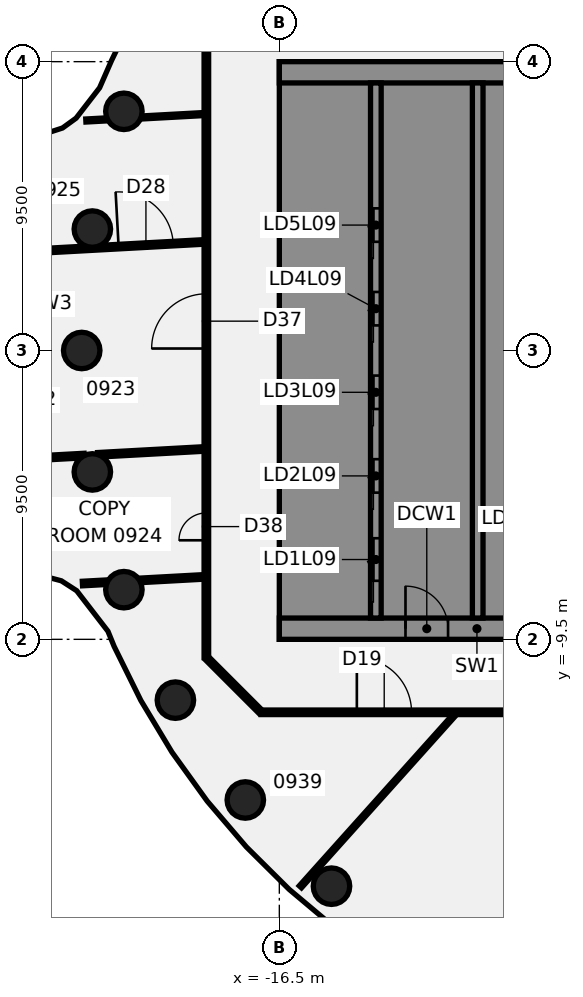
"""IFC4 building model, lengths in metres.
Left out: names, types, materials, properties, quantities, classifications, styles, units other than length and angle.
Written with IfcOpenShell. Run it as: python <this file> out.ifc"""

import sys

from ifc_helpers import new_model, si_unit, direction, frame, frame_2d, origin, origin_2d, place, context, subcontext, project, spatial, polyline, rectangle, circle, outline, extrude, element, fill, save


model = new_model("IFC4")
c1 = context("Model", 3, precision=1e-05, world=origin(), true_north=direction((0.0, 1.0)))
c2 = subcontext(c1, "Body", "Model", "MODEL_VIEW")
j1 = project(units=[si_unit("LENGTHUNIT", "METRE"), si_unit("PLANEANGLEUNIT", "RADIAN")], contexts=[c1])
p1 = place(None, origin())
s1 = spatial("IfcSite", under=j1, at=p1, CompositionType="ELEMENT")
p2 = place(p1, origin())
s2 = spatial("IfcBuilding", under=s1, at=p2, CompositionType="ELEMENT")
p3 = place(p2, frame((0.0, 0.0, 45.25)))
s3 = spatial("IfcBuildingStorey", under=s2, at=p3, CompositionType="ELEMENT", Elevation=45.25)
for number, where, z_axis, x_axis in (
    (1, (-21.613, 7.866, -0.14), (0.0, 0.0, 1.0), (1.0, 0.0, 0.0)),
    (2, (-22.651, 3.994, -0.14), (0.0, 0.0, 1.0), (1.0, 0.0, 0.0)),
    (3, (-23.0, 0.0, -0.14), (0.0, 0.0, 1.0), (1.0, 0.0, 0.0)),
    (4, (-22.651, -3.994, -0.14), (0.0, 0.0, 1.0), (1.0, 0.0, 0.0)),
    (5, (-21.613, -7.866, -0.14), (0.0, 0.0, 1.0), (1.0, 0.0, 0.0)),
    (6, (-19.919, -11.5, -0.14), (0.0, 0.0, 1.0), (1.0, 0.0, 0.0)),
    (7, (-17.619, -14.784, -0.14), (0.0, 0.0, 1.0), (1.0, 0.0, 0.0)),
    (8, (-14.784, -17.619, -0.14), (0.0, 0.0, 1.0), (1.0, 0.0, 0.0)),
):
    element("IfcColumn", number, at=place(p3, frame(where, z_axis=z_axis, x_axis=x_axis)), inside=s3, PredefinedType="COLUMN", context=c2, shape_type="SweptSolid", body=[
        extrude(circle(Radius=0.6, at=origin_2d()), origin(), (0.0, 0.0, 1.0), 3.75),
    ])
p4 = place(p3, frame((-18.872, -10.128, 0.0), z_axis=(0.0, 0.0, 1.0), x_axis=(0.707106781187, -0.707106781187, 0.0)))
e9 = element("IfcWall", 9, at=p4, inside=s3, PredefinedType="PARTITIONING", context=c2, shape_type="SweptSolid", body=[
    extrude(rectangle(XDim=2.465, YDim=0.15, at=frame_2d((1.232, 0.0))), origin(), (0.0, 0.0, 1.0), 3.01),
])
p5 = place(p3, frame((-17.1, -11.9, 0.0), z_axis=(0.0, 0.0, 1.0), x_axis=(1.0, 0.0, 0.0)))
e10 = element("IfcWall", 10, at=p5, inside=s3, PredefinedType="PARTITIONING", context=c2, shape_type="SweptSolid", body=[
    extrude(rectangle(XDim=34.165, YDim=0.15, at=frame_2d((17.083, 0.0))), origin(), (0.0, 0.0, 1.0), 3.01),
])
p6 = place(p5, frame((15.692, 0.0, 0.0)))
e11 = element("IfcOpeningElement", 11, at=p6, cuts=e10, PredefinedType="OPENING", context=c2, shape_type="SweptSolid", body=[
    extrude(rectangle(XDim=1.8, YDim=2.1, at=frame_2d((0.9, 1.05))), frame((0.0, 0.085, 0.0), z_axis=(0.0, -1.0, 0.0), x_axis=(1.0, 0.0, 0.0)), (0.0, 0.0, 1.0), 0.17),
])
p7 = place(p5, frame((3.15, 0.0, 0.0)))
e12 = element("IfcOpeningElement", 12, at=p7, cuts=e10, PredefinedType="OPENING", context=c2, shape_type="SweptSolid", body=[
    extrude(rectangle(XDim=1.8, YDim=2.1, at=frame_2d((0.9, 1.05))), frame((0.0, 0.085, 0.0), z_axis=(0.0, -1.0, 0.0), x_axis=(1.0, 0.0, 0.0)), (0.0, 0.0, 1.0), 0.17),
])
p8 = place(p5, frame((25.658, 0.0, 0.0)))
e13 = element("IfcOpeningElement", 13, at=p8, cuts=e10, PredefinedType="OPENING", context=c2, shape_type="SweptSolid", body=[
    extrude(rectangle(XDim=1.8, YDim=2.1, at=frame_2d((0.9, 1.05))), frame((0.0, 0.085, 0.0), z_axis=(0.0, -1.0, 0.0), x_axis=(1.0, 0.0, 0.0)), (0.0, 0.0, 1.0), 0.17),
])
p9 = place(p3, frame((-25.89, 3.192, 0.0), z_axis=(0.0, 0.0, 1.0), x_axis=(0.998500993822, 0.054733585091, 0.0)))
e14 = element("IfcWall", 14, at=p9, inside=s3, PredefinedType="PARTITIONING", context=c2, shape_type="SweptSolid", body=[
    extrude(rectangle(XDim=6.941, YDim=0.15, at=frame_2d((3.47, 0.0))), origin(), (0.0, 0.0, 1.0), 3.01),
])
p10 = place(p9, frame((4.11, 0.0, 0.0)))
e15 = element("IfcOpeningElement", 15, at=p10, cuts=e14, PredefinedType="OPENING", context=c2, shape_type="SweptSolid", body=[
    extrude(rectangle(XDim=1.8, YDim=2.1, at=frame_2d((0.9, 1.05))), frame((0.0, 0.085, 0.0), z_axis=(0.0, -1.0, 0.0), x_axis=(1.0, 0.0, 0.0)), (0.0, 0.0, 1.0), 0.17),
])
p11 = place(p3, frame((-25.518, -3.598, 0.0), z_axis=(0.0, 0.0, 1.0), x_axis=(0.99849534005, 0.054836629171, 0.0)))
e16 = element("IfcWall", 16, at=p11, inside=s3, PredefinedType="PARTITIONING", context=c2, shape_type="SweptSolid", body=[
    extrude(rectangle(XDim=2.604, YDim=0.15, at=frame_2d((1.302, 0.0))), origin(), (0.0, 0.0, 1.0), 3.01),
])
p12 = place(p3, frame((-22.475, -3.431, 0.0), z_axis=(0.0, 0.0, 1.0), x_axis=(0.998497685075, 0.054793912976, 0.0)))
e17 = element("IfcWall", 17, at=p12, inside=s3, PredefinedType="PARTITIONING", context=c2, shape_type="SweptSolid", body=[
    extrude(rectangle(XDim=3.52, YDim=0.15, at=frame_2d((1.76, 0.0))), origin(), (0.0, 0.0, 1.0), 3.01),
])
p13 = place(p3, frame((-22.976, -7.665, 0.0), z_axis=(0.0, 0.0, 1.0), x_axis=(0.998515707931, 0.05446449316, 0.0)))
e18 = element("IfcWall", 18, at=p13, inside=s3, PredefinedType="PARTITIONING", context=c2, shape_type="SweptSolid", body=[
    extrude(rectangle(XDim=0.82, YDim=0.15, at=frame_2d((0.41, 0.0))), origin(), (0.0, 0.0, 1.0), 3.01),
])
p14 = place(p3, frame((-21.085, -7.562, 0.0), z_axis=(0.0, 0.0, 1.0), x_axis=(0.998507642366, 0.054612161067, 0.0)))
e19 = element("IfcWall", 19, at=p14, inside=s3, PredefinedType="PARTITIONING", context=c2, shape_type="SweptSolid", body=[
    extrude(rectangle(XDim=2.128, YDim=0.15, at=frame_2d((1.064, 0.0))), origin(), (0.0, 0.0, 1.0), 3.01),
])
p15 = place(p3, frame((-22.864, 7.564, 0.0), z_axis=(0.0, 0.0, 1.0), x_axis=(0.998515707931, 0.05446449316, 0.0)))
e20 = element("IfcWall", 20, at=p15, inside=s3, PredefinedType="PARTITIONING", context=c2, shape_type="SweptSolid", body=[
    extrude(rectangle(XDim=0.713, YDim=0.1, at=frame_2d((0.356, 0.0))), origin(), (0.0, 0.0, 1.0), 3.01),
])
p16 = place(p3, frame((-21.058, 7.663, 0.0), z_axis=(0.0, 0.0, 1.0), x_axis=(0.998507192327, 0.05462038878, 0.0)))
e21 = element("IfcWall", 21, at=p16, inside=s3, PredefinedType="PARTITIONING", context=c2, shape_type="SweptSolid", body=[
    extrude(rectangle(XDim=2.101, YDim=0.1, at=frame_2d((1.05, 0.0))), origin(), (0.0, 0.0, 1.0), 3.01),
])
p17 = place(p3, frame((-15.808, -17.64, 0.0), z_axis=(0.0, 0.0, 1.0), x_axis=(0.667405989545, 0.744694061423, 0.0)))
e22 = element("IfcWall", 22, at=p17, inside=s3, PredefinedType="PARTITIONING", context=c2, shape_type="SweptSolid", body=[
    extrude(rectangle(XDim=7.588, YDim=0.1, at=frame_2d((3.794, 0.0))), origin(), (0.0, 0.0, 1.0), 3.01),
])
p18 = place(p3, frame((-18.9, -10.1, 0.0), z_axis=(0.0, 0.0, 1.0), x_axis=(0.0, 1.0, 0.0)))
e23 = element("IfcWall", 23, at=p18, inside=s3, PredefinedType="PARTITIONING", context=c2, shape_type="SweptSolid", body=[
    extrude(rectangle(XDim=20.2, YDim=0.15, at=frame_2d((10.1, 0.0))), origin(), (0.0, 0.0, 1.0), 3.01),
])
p19 = place(p18, frame((10.165, 0.0, 0.0)))
e24 = element("IfcOpeningElement", 24, at=p19, cuts=e23, PredefinedType="OPENING", context=c2, shape_type="SweptSolid", body=[
    extrude(rectangle(XDim=1.8, YDim=2.1, at=frame_2d((0.9, 1.05))), frame((0.0, 0.085, 0.0), z_axis=(0.0, -1.0, 0.0), x_axis=(1.0, 0.0, 0.0)), (0.0, 0.0, 1.0), 0.17),
])
p20 = place(p18, frame((3.858, 0.0, 0.0)))
e25 = element("IfcOpeningElement", 25, at=p20, cuts=e23, PredefinedType="OPENING", context=c2, shape_type="SweptSolid", body=[
    extrude(rectangle(XDim=0.9, YDim=2.1, at=frame_2d((0.45, 1.05))), frame((0.0, 0.085, 0.0), z_axis=(0.0, -1.0, 0.0), x_axis=(1.0, 0.0, 0.0)), (0.0, 0.0, 1.0), 0.17),
])
p21 = place(p3, frame((-16.5, -9.15, 0.0), z_axis=(0.0, 0.0, 1.0), x_axis=(1.0, 0.0, 0.0)))
e26 = element("IfcWall", 26, at=p21, inside=s3, PredefinedType="SHEAR", context=c2, shape_type="SweptSolid", body=[
    extrude(rectangle(XDim=13.0, YDim=0.7, at=frame_2d((6.5, 0.0))), origin(), (0.0, 0.0, 1.0), 3.61),
])
p22 = place(p21, frame((4.15, 0.0, 0.0)))
e27 = element("IfcOpeningElement", 27, at=p22, cuts=e26, PredefinedType="OPENING", context=c2, shape_type="SweptSolid", body=[
    extrude(rectangle(XDim=1.4, YDim=2.1, at=frame_2d((0.7, 1.05))), frame((0.0, 0.36, 0.0), z_axis=(0.0, -1.0, 0.0), x_axis=(1.0, 0.0, 0.0)), (0.0, 0.0, 1.0), 0.72),
])
p23 = place(p21, frame((10.125, 0.0, 0.0)))
e28 = element("IfcOpeningElement", 28, at=p23, cuts=e26, PredefinedType="OPENING", context=c2, shape_type="SweptSolid", body=[
    extrude(rectangle(XDim=1.4, YDim=2.1, at=frame_2d((0.7, 1.05))), frame((0.0, 0.36, 0.0), z_axis=(0.0, -1.0, 0.0), x_axis=(1.0, 0.0, 0.0)), (0.0, 0.0, 1.0), 0.72),
])
p24 = place(p3, origin())
e29 = element("IfcWall", 29, at=p24, inside=s3, PredefinedType="SHEAR", context=c2, shape_type="SweptSolid", body=[
    extrude(outline(polyline([(-13.5, -8.8), (-13.5, -8.125), (-15.8, -8.125), (-15.8, -5.625), (-13.5, -5.625), (-13.5, -5.375), (-15.8, -5.375), (-15.8, -2.875), (-13.5, -2.875), (-13.5, -2.625), (-15.8, -2.625), (-15.8, -0.125), (-13.5, -0.125), (-13.5, 0.125), (-15.8, 0.125), (-15.8, 2.625), (-13.5, 2.625), (-13.5, 2.875), (-15.8, 2.875), (-15.8, 5.375), (-13.5, 5.375), (-13.5, 5.625), (-15.8, 5.625), (-15.8, 8.125), (-13.5, 8.125), (-13.5, 8.8), (-15.8, 8.8), (-16.5, 8.8), (-16.5, -8.8), (-15.8, -8.8), (-13.5, -8.8)])), origin(), (0.0, 0.0, 1.0), 3.61),
])
p25 = place(p3, frame((-16.5, 9.15, 0.0), z_axis=(0.0, 0.0, 1.0), x_axis=(1.0, 0.0, 0.0)))
e30 = element("IfcWall", 30, at=p25, inside=s3, PredefinedType="SHEAR", context=c2, shape_type="SweptSolid", body=[
    extrude(rectangle(XDim=13.0, YDim=0.7, at=frame_2d((6.5, 0.0))), origin(), (0.0, 0.0, 1.0), 3.61),
])
p26 = place(p3, origin())
e31 = element("IfcWall", 31, at=p26, inside=s3, PredefinedType="SHEAR", context=c2, shape_type="SweptSolid", body=[
    extrude(outline(polyline([(-9.8, -5.375), (-9.8, -5.625), (-7.5, -5.625), (-7.15, -5.625), (-7.15, 8.8), (-7.5, 8.8), (-9.8, 8.8), (-9.8, 8.125), (-7.5, 8.125), (-7.5, 5.625), (-9.8, 5.625), (-9.8, 5.375), (-7.5, 5.375), (-7.5, 2.875), (-9.8, 2.875), (-9.8, 2.625), (-7.5, 2.625), (-7.5, 0.125), (-9.8, 0.125), (-9.8, -0.125), (-7.5, -0.125), (-7.5, -2.625), (-9.8, -2.625), (-9.8, -2.875), (-7.5, -2.875), (-7.5, -5.375), (-9.8, -5.375)])), origin(), (0.0, 0.0, 1.0), 3.61),
])
p27 = place(p3, origin())
e32 = element("IfcWall", 32, at=p27, inside=s3, PredefinedType="SHEAR", context=c2, shape_type="SweptSolid", body=[
    extrude(outline(polyline([(-7.5, -8.125), (-9.55, -8.125), (-9.55, -5.625), (-9.8, -5.625), (-9.8, -8.125), (-9.8, -8.8), (-7.5, -8.8), (-7.5, -8.125)])), origin(), (0.0, 0.0, 1.0), 3.61),
])
p28 = place(p3, frame((-13.325, -8.8, 0.0), z_axis=(0.0, 0.0, 1.0), x_axis=(0.0, 1.0, 0.0)))
e33 = element("IfcWall", 33, at=p28, inside=s3, PredefinedType="SHEAR", context=c2, shape_type="SweptSolid", body=[
    extrude(rectangle(XDim=17.6, YDim=0.35, at=frame_2d((8.8, 0.0))), origin(), (0.0, 0.0, 1.0), 3.61),
])
p29 = place(p28, frame((1.225, 0.0, 0.0)))
e34 = element("IfcOpeningElement", 34, at=p29, cuts=e33, PredefinedType="OPENING", context=c2, shape_type="SweptSolid", body=[
    extrude(rectangle(XDim=1.4, YDim=2.1, at=frame_2d((0.7, 1.05))), frame((0.0, 0.185, 0.0), z_axis=(0.0, -1.0, 0.0), x_axis=(1.0, 0.0, 0.0)), (0.0, 0.0, 1.0), 0.37),
])
p30 = place(p28, frame((4.125, 0.0, 0.0)))
e35 = element("IfcOpeningElement", 35, at=p30, cuts=e33, PredefinedType="OPENING", context=c2, shape_type="SweptSolid", body=[
    extrude(rectangle(XDim=1.1, YDim=2.1, at=frame_2d((0.55, 1.05))), frame((0.0, 0.185, 0.0), z_axis=(0.0, -1.0, 0.0), x_axis=(1.0, 0.0, 0.0)), (0.0, 0.0, 1.0), 0.37),
])
p31 = place(p28, frame((6.875, 0.0, 0.0)))
e36 = element("IfcOpeningElement", 36, at=p31, cuts=e33, PredefinedType="OPENING", context=c2, shape_type="SweptSolid", body=[
    extrude(rectangle(XDim=1.1, YDim=2.1, at=frame_2d((0.55, 1.05))), frame((0.0, 0.185, 0.0), z_axis=(0.0, -1.0, 0.0), x_axis=(1.0, 0.0, 0.0)), (0.0, 0.0, 1.0), 0.37),
])
p32 = place(p28, frame((9.625, 0.0, 0.0)))
e37 = element("IfcOpeningElement", 37, at=p32, cuts=e33, PredefinedType="OPENING", context=c2, shape_type="SweptSolid", body=[
    extrude(rectangle(XDim=1.1, YDim=2.1, at=frame_2d((0.55, 1.05))), frame((0.0, 0.185, 0.0), z_axis=(0.0, -1.0, 0.0), x_axis=(1.0, 0.0, 0.0)), (0.0, 0.0, 1.0), 0.37),
])
p33 = place(p28, frame((12.375, 0.0, 0.0)))
e38 = element("IfcOpeningElement", 38, at=p33, cuts=e33, PredefinedType="OPENING", context=c2, shape_type="SweptSolid", body=[
    extrude(rectangle(XDim=1.1, YDim=2.1, at=frame_2d((0.55, 1.05))), frame((0.0, 0.185, 0.0), z_axis=(0.0, -1.0, 0.0), x_axis=(1.0, 0.0, 0.0)), (0.0, 0.0, 1.0), 0.37),
])
p34 = place(p3, frame((-9.975, -8.8, 0.0), z_axis=(0.0, 0.0, 1.0), x_axis=(0.0, 1.0, 0.0)))
e39 = element("IfcWall", 39, at=p34, inside=s3, PredefinedType="SHEAR", context=c2, shape_type="SweptSolid", body=[
    extrude(rectangle(XDim=17.6, YDim=0.35, at=frame_2d((8.8, 0.0))), origin(), (0.0, 0.0, 1.0), 3.61),
])
p35 = place(p7, frame((1.8, 0.0, 0.0), z_axis=(0.0, 0.0, 1.0), x_axis=(-1.0, 0.0, 0.0)))
e40 = element("IfcDoor", 40, at=p35, inside=s3, OperationType="DOUBLE_DOOR_SINGLE_SWING", PredefinedType="DOOR", context=c2, shape_type="SweptSolid", body=[
    extrude(rectangle(XDim=1.8, YDim=2.1, at=frame_2d((0.9, 1.05))), frame((0.0, 0.025, 0.0), z_axis=(0.0, -1.0, 0.0), x_axis=(1.0, 0.0, 0.0)), (0.0, 0.0, 1.0), 0.05),
])
fill(e12, e40)
p36 = place(p10, origin())
e41 = element("IfcDoor", 41, at=p36, inside=s3, OperationType="DOUBLE_DOOR_SINGLE_SWING", PredefinedType="DOOR", context=c2, shape_type="SweptSolid", body=[
    extrude(rectangle(XDim=1.8, YDim=2.1, at=frame_2d((0.9, 1.05))), frame((0.0, 0.025, 0.0), z_axis=(0.0, -1.0, 0.0), x_axis=(1.0, 0.0, 0.0)), (0.0, 0.0, 1.0), 0.05),
])
fill(e15, e41)
p37 = place(p19, frame((1.8, 0.0, 0.0), z_axis=(0.0, 0.0, 1.0), x_axis=(-1.0, 0.0, 0.0)))
e42 = element("IfcDoor", 42, at=p37, inside=s3, OperationType="DOUBLE_DOOR_SINGLE_SWING", PredefinedType="DOOR", context=c2, shape_type="SweptSolid", body=[
    extrude(rectangle(XDim=1.8, YDim=2.1, at=frame_2d((0.9, 1.05))), frame((0.0, 0.025, 0.0), z_axis=(0.0, -1.0, 0.0), x_axis=(1.0, 0.0, 0.0)), (0.0, 0.0, 1.0), 0.05),
])
fill(e24, e42)
p38 = place(p20, origin())
e43 = element("IfcDoor", 43, at=p38, inside=s3, OperationType="SINGLE_SWING_RIGHT", PredefinedType="DOOR", context=c2, shape_type="SweptSolid", body=[
    extrude(rectangle(XDim=0.9, YDim=2.1, at=frame_2d((0.45, 1.05))), frame((0.0, 0.025, 0.0), z_axis=(0.0, -1.0, 0.0), x_axis=(1.0, 0.0, 0.0)), (0.0, 0.0, 1.0), 0.05),
])
fill(e25, e43)
p39 = place(p22, origin())
e44 = element("IfcDoor", 44, at=p39, inside=s3, OperationType="SINGLE_SWING_LEFT", PredefinedType="DOOR", context=c2, shape_type="SweptSolid", body=[
    extrude(rectangle(XDim=1.4, YDim=2.1, at=frame_2d((0.7, 1.05))), frame((0.0, 0.025, 0.0), z_axis=(0.0, -1.0, 0.0), x_axis=(1.0, 0.0, 0.0)), (0.0, 0.0, 1.0), 0.05),
])
fill(e27, e44)
p40 = place(p29, origin())
e45 = element("IfcDoor", 45, at=p40, inside=s3, OperationType="SLIDING_TO_LEFT", PredefinedType="DOOR", context=c2, shape_type="SweptSolid", body=[
    extrude(rectangle(XDim=1.4, YDim=2.1, at=frame_2d((0.7, 1.05))), frame((0.0, 0.025, 0.0), z_axis=(0.0, -1.0, 0.0), x_axis=(1.0, 0.0, 0.0)), (0.0, 0.0, 1.0), 0.05),
])
fill(e34, e45)
p41 = place(p30, origin())
e46 = element("IfcDoor", 46, at=p41, inside=s3, OperationType="SLIDING_TO_LEFT", PredefinedType="DOOR", context=c2, shape_type="SweptSolid", body=[
    extrude(rectangle(XDim=1.1, YDim=2.1, at=frame_2d((0.55, 1.05))), frame((0.0, 0.025, 0.0), z_axis=(0.0, -1.0, 0.0), x_axis=(1.0, 0.0, 0.0)), (0.0, 0.0, 1.0), 0.05),
])
fill(e35, e46)
p42 = place(p31, origin())
e47 = element("IfcDoor", 47, at=p42, inside=s3, OperationType="SLIDING_TO_LEFT", PredefinedType="DOOR", context=c2, shape_type="SweptSolid", body=[
    extrude(rectangle(XDim=1.1, YDim=2.1, at=frame_2d((0.55, 1.05))), frame((0.0, 0.025, 0.0), z_axis=(0.0, -1.0, 0.0), x_axis=(1.0, 0.0, 0.0)), (0.0, 0.0, 1.0), 0.05),
])
fill(e36, e47)
p43 = place(p32, origin())
e48 = element("IfcDoor", 48, at=p43, inside=s3, OperationType="SLIDING_TO_LEFT", PredefinedType="DOOR", context=c2, shape_type="SweptSolid", body=[
    extrude(rectangle(XDim=1.1, YDim=2.1, at=frame_2d((0.55, 1.05))), frame((0.0, 0.025, 0.0), z_axis=(0.0, -1.0, 0.0), x_axis=(1.0, 0.0, 0.0)), (0.0, 0.0, 1.0), 0.05),
])
fill(e37, e48)
p44 = place(p33, origin())
e49 = element("IfcDoor", 49, at=p44, inside=s3, OperationType="SLIDING_TO_LEFT", PredefinedType="DOOR", context=c2, shape_type="SweptSolid", body=[
    extrude(rectangle(XDim=1.1, YDim=2.1, at=frame_2d((0.55, 1.05))), frame((0.0, 0.025, 0.0), z_axis=(0.0, -1.0, 0.0), x_axis=(1.0, 0.0, 0.0)), (0.0, 0.0, 1.0), 0.05),
])
fill(e38, e49)
save(model, sys.argv[1])
